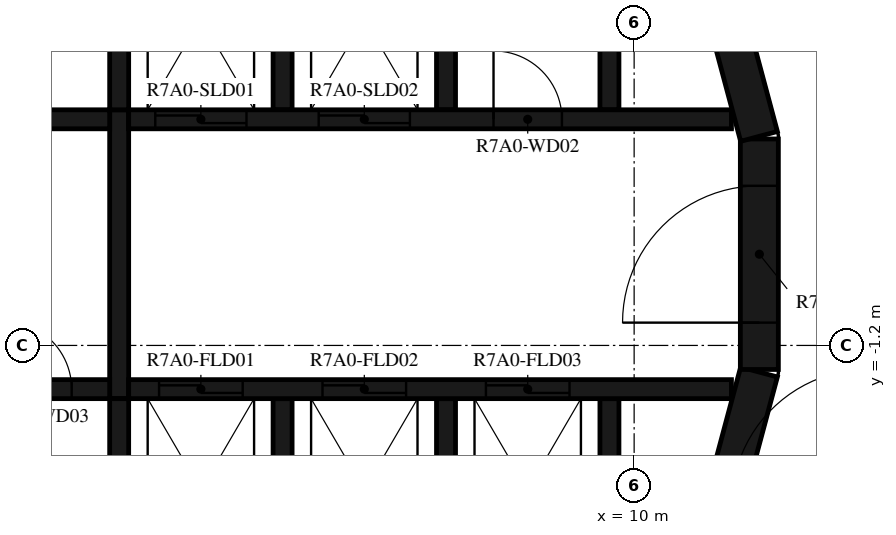
"""IFC4 building model, lengths in metres.
Left out: names, types, materials, properties, quantities, classifications, styles, units other than length and angle.
Written with IfcOpenShell. Run it as: python <this file> out.ifc"""

import sys

from ifc_helpers import new_model, si_unit, direction, frame, frame_2d, origin, place, context, subcontext, project, spatial, polyline, rectangle, outline, extrude, element, fill, save


model = new_model("IFC4")
c1 = context("Model", 3, precision=1e-05, world=origin(), true_north=direction((0.0, 1.0)))
c2 = subcontext(c1, "Body", "Model", "MODEL_VIEW")
j1 = project(units=[si_unit("LENGTHUNIT", "METRE"), si_unit("PLANEANGLEUNIT", "RADIAN")], contexts=[c1])
p1 = place(None, origin())
s1 = spatial("IfcSite", under=j1, at=p1, CompositionType="ELEMENT")
p2 = place(p1, origin())
s2 = spatial("IfcBuilding", under=s1, at=p2, CompositionType="ELEMENT")
p3 = place(p2, frame((0.0, 0.0, 270.4)))
s3 = spatial("IfcBuildingStorey", under=s2, at=p3, CompositionType="ELEMENT", Elevation=270.4)
p4 = place(p3, frame((10.858, -4.479, 0.0), z_axis=(0.0, 0.0, 1.0), x_axis=(0.258734743916, 0.965948410781, 0.0)))
e1 = element("IfcWall", 1, at=p4, inside=s3, PredefinedType="SHEAR", context=c2, shape_type="SweptSolid", body=[
    extrude(rectangle(XDim=3.033, YDim=0.5, at=frame_2d((1.516, 0.0))), origin(), (0.0, 0.0, 1.0), 3.12),
])
p5 = place(p3, frame((11.647, -1.516, 0.0), z_axis=(0.0, 0.0, 1.0), x_axis=(0.0, 1.0, 0.0)))
e2 = element("IfcWall", 2, at=p5, inside=s3, PredefinedType="SHEAR", context=c2, shape_type="SweptSolid", body=[
    extrude(rectangle(XDim=3.033, YDim=0.5, at=frame_2d((1.516, 0.0))), origin(), (0.0, 0.0, 1.0), 3.12),
])
p6 = place(p5, frame((0.616, 0.0, 0.0)))
e3 = element("IfcOpeningElement", 3, at=p6, cuts=e2, PredefinedType="OPENING", context=c2, shape_type="SweptSolid", body=[
    extrude(rectangle(XDim=1.8, YDim=2.1, at=frame_2d((0.9, 1.05))), frame((0.0, 0.26, 0.0), z_axis=(0.0, -1.0, 0.0), x_axis=(1.0, 0.0, 0.0)), (0.0, 0.0, 1.0), 0.52),
])
p7 = place(p3, frame((11.643, 1.55, 0.0), z_axis=(0.0, 0.0, 1.0), x_axis=(-0.258734743916, 0.965948410781, 0.0)))
e4 = element("IfcWall", 4, at=p7, inside=s3, PredefinedType="SHEAR", context=c2, shape_type="SweptSolid", body=[
    extrude(rectangle(XDim=3.033, YDim=0.5, at=frame_2d((1.516, 0.0))), origin(), (0.0, 0.0, 1.0), 3.12),
])
p8 = place(p3, origin())
e5 = element("IfcWall", 5, at=p8, inside=s3, PredefinedType="SHEAR", context=c2, shape_type="SweptSolid", body=[
    extrude(outline(polyline([(-9.8, 1.9), (-9.55, 1.9), (-9.55, 4.8), (3.1, 4.8), (3.1, 1.9), (3.35, 1.9), (3.35, 4.8), (5.25, 4.8), (5.25, 1.9), (5.5, 1.9), (5.5, 4.8), (7.4, 4.8), (7.4, 1.9), (7.65, 1.9), (7.65, 4.8), (9.55, 4.8), (9.55, 1.9), (9.8, 1.9), (9.8, 4.8), (9.8, 5.05), (-9.8, 5.05), (-9.8, 4.8), (-9.8, 1.9)])), origin(), (0.0, 0.0, 1.0), 3.12),
])
p9 = place(p3, origin())
e6 = element("IfcWall", 6, at=p9, inside=s3, PredefinedType="SHEAR", context=c2, shape_type="SweptSolid", body=[
    extrude(outline(polyline([(9.8, -5.05), (9.8, -4.8), (9.8, -1.9), (9.55, -1.9), (9.55, -4.8), (7.65, -4.8), (7.65, -1.9), (7.4, -1.9), (7.4, -4.8), (5.5, -4.8), (5.5, -1.9), (5.25, -1.9), (5.25, -4.8), (3.35, -4.8), (3.35, -1.9), (3.1, -1.9), (3.1, -4.8), (1.2, -4.8), (1.2, -1.9), (0.95, -1.9), (0.95, -4.8), (-0.95, -4.8), (-0.95, -1.9), (-1.2, -1.9), (-1.2, -4.8), (-3.1, -4.8), (-3.1, -1.9), (-3.35, -1.9), (-3.35, -4.8), (-5.25, -4.8), (-5.25, -1.9), (-5.5, -1.9), (-5.5, -4.8), (-7.4, -4.8), (-7.4, -1.9), (-7.65, -1.9), (-7.65, -4.8), (-9.55, -4.8), (-9.55, -1.9), (-9.8, -1.9), (-9.8, -4.8), (-9.8, -5.05), (9.8, -5.05)])), origin(), (0.0, 0.0, 1.0), 3.12),
])
p10 = place(p3, frame((-11.28, 1.775, 0.0), z_axis=(0.0, 0.0, 1.0), x_axis=(1.0, 0.0, 0.0)))
e7 = element("IfcWall", 7, at=p10, inside=s3, PredefinedType="SHEAR", context=c2, shape_type="SweptSolid", body=[
    extrude(rectangle(XDim=14.38, YDim=0.25, at=frame_2d((7.19, 0.0))), origin(), (0.0, 0.0, 1.0), 3.12),
])
p11 = place(p10, frame((7.605, 0.0, 0.0)))
e8 = element("IfcOpeningElement", 8, at=p11, cuts=e7, PredefinedType="OPENING", context=c2, shape_type="SweptSolid", body=[
    extrude(rectangle(XDim=0.9, YDim=2.1, at=frame_2d((0.45, 1.05))), frame((0.0, 0.135, 0.0), z_axis=(0.0, -1.0, 0.0), x_axis=(1.0, 0.0, 0.0)), (0.0, 0.0, 1.0), 0.27),
])
p12 = place(p3, frame((3.35, 1.775, 0.0), z_axis=(0.0, 0.0, 1.0), x_axis=(1.0, 0.0, 0.0)))
e9 = element("IfcWall", 9, at=p12, inside=s3, PredefinedType="SHEAR", context=c2, shape_type="SweptSolid", body=[
    extrude(rectangle(XDim=7.93, YDim=0.25, at=frame_2d((3.965, 0.0))), origin(), (0.0, 0.0, 1.0), 3.12),
])
p13 = place(p12, frame((0.35, 0.0, 0.0)))
e10 = element("IfcOpeningElement", 10, at=p13, cuts=e9, PredefinedType="OPENING", context=c2, shape_type="SweptSolid", body=[
    extrude(rectangle(XDim=1.2, YDim=2.4, at=frame_2d((0.6, 1.2))), frame((0.0, 0.135, 0.0), z_axis=(0.0, -1.0, 0.0), x_axis=(1.0, 0.0, 0.0)), (0.0, 0.0, 1.0), 0.27),
])
p14 = place(p12, frame((2.5, 0.0, 0.0)))
e11 = element("IfcOpeningElement", 11, at=p14, cuts=e9, PredefinedType="OPENING", context=c2, shape_type="SweptSolid", body=[
    extrude(rectangle(XDim=1.2, YDim=2.4, at=frame_2d((0.6, 1.2))), frame((0.0, 0.135, 0.0), z_axis=(0.0, -1.0, 0.0), x_axis=(1.0, 0.0, 0.0)), (0.0, 0.0, 1.0), 0.27),
])
p15 = place(p12, frame((4.8, 0.0, 0.0)))
e12 = element("IfcOpeningElement", 12, at=p15, cuts=e9, PredefinedType="OPENING", context=c2, shape_type="SweptSolid", body=[
    extrude(rectangle(XDim=0.9, YDim=2.1, at=frame_2d((0.45, 1.05))), frame((0.0, 0.135, 0.0), z_axis=(0.0, -1.0, 0.0), x_axis=(1.0, 0.0, 0.0)), (0.0, 0.0, 1.0), 0.27),
])
p16 = place(p3, frame((-11.28, -1.775, 0.0), z_axis=(0.0, 0.0, 1.0), x_axis=(1.0, 0.0, 0.0)))
e13 = element("IfcWall", 13, at=p16, inside=s3, PredefinedType="SHEAR", context=c2, shape_type="SweptSolid", body=[
    extrude(rectangle(XDim=14.38, YDim=0.25, at=frame_2d((7.19, 0.0))), origin(), (0.0, 0.0, 1.0), 3.12),
])
p17 = place(p16, frame((2.03, 0.0, 0.0)))
e14 = element("IfcOpeningElement", 14, at=p17, cuts=e13, PredefinedType="OPENING", context=c2, shape_type="SweptSolid", body=[
    extrude(rectangle(XDim=1.3, YDim=2.1, at=frame_2d((0.65, 1.05))), frame((0.0, 0.135, 0.0), z_axis=(0.0, -1.0, 0.0), x_axis=(1.0, 0.0, 0.0)), (0.0, 0.0, 1.0), 0.27),
])
p18 = place(p16, frame((4.18, 0.0, 0.0)))
e15 = element("IfcOpeningElement", 15, at=p18, cuts=e13, PredefinedType="OPENING", context=c2, shape_type="SweptSolid", body=[
    extrude(rectangle(XDim=1.3, YDim=2.1, at=frame_2d((0.65, 1.05))), frame((0.0, 0.135, 0.0), z_axis=(0.0, -1.0, 0.0), x_axis=(1.0, 0.0, 0.0)), (0.0, 0.0, 1.0), 0.27),
])
p19 = place(p16, frame((6.43, 0.0, 0.0)))
e16 = element("IfcOpeningElement", 16, at=p19, cuts=e13, PredefinedType="OPENING", context=c2, shape_type="SweptSolid", body=[
    extrude(rectangle(XDim=1.1, YDim=2.1, at=frame_2d((0.55, 1.05))), frame((0.0, 0.135, 0.0), z_axis=(0.0, -1.0, 0.0), x_axis=(1.0, 0.0, 0.0)), (0.0, 0.0, 1.0), 0.27),
])
p20 = place(p16, frame((8.58, 0.0, 0.0)))
e17 = element("IfcOpeningElement", 17, at=p20, cuts=e13, PredefinedType="OPENING", context=c2, shape_type="SweptSolid", body=[
    extrude(rectangle(XDim=1.1, YDim=2.1, at=frame_2d((0.55, 1.05))), frame((0.0, 0.135, 0.0), z_axis=(0.0, -1.0, 0.0), x_axis=(1.0, 0.0, 0.0)), (0.0, 0.0, 1.0), 0.27),
])
p21 = place(p16, frame((10.73, 0.0, 0.0)))
e18 = element("IfcOpeningElement", 18, at=p21, cuts=e13, PredefinedType="OPENING", context=c2, shape_type="SweptSolid", body=[
    extrude(rectangle(XDim=1.1, YDim=2.1, at=frame_2d((0.55, 1.05))), frame((0.0, 0.135, 0.0), z_axis=(0.0, -1.0, 0.0), x_axis=(1.0, 0.0, 0.0)), (0.0, 0.0, 1.0), 0.27),
])
p22 = place(p16, frame((12.98, 0.0, 0.0)))
e19 = element("IfcOpeningElement", 19, at=p22, cuts=e13, PredefinedType="OPENING", context=c2, shape_type="SweptSolid", body=[
    extrude(rectangle(XDim=0.9, YDim=2.1, at=frame_2d((0.45, 1.05))), frame((0.0, 0.135, 0.0), z_axis=(0.0, -1.0, 0.0), x_axis=(1.0, 0.0, 0.0)), (0.0, 0.0, 1.0), 0.27),
])
p23 = place(p3, frame((3.35, -1.775, 0.0), z_axis=(0.0, 0.0, 1.0), x_axis=(1.0, 0.0, 0.0)))
e20 = element("IfcWall", 20, at=p23, inside=s3, PredefinedType="SHEAR", context=c2, shape_type="SweptSolid", body=[
    extrude(rectangle(XDim=7.93, YDim=0.25, at=frame_2d((3.965, 0.0))), origin(), (0.0, 0.0, 1.0), 3.12),
])
p24 = place(p23, frame((0.4, 0.0, 0.0)))
e21 = element("IfcOpeningElement", 21, at=p24, cuts=e20, PredefinedType="OPENING", context=c2, shape_type="SweptSolid", body=[
    extrude(rectangle(XDim=1.1, YDim=2.4, at=frame_2d((0.55, 1.2))), frame((0.0, 0.135, 0.0), z_axis=(0.0, -1.0, 0.0), x_axis=(1.0, 0.0, 0.0)), (0.0, 0.0, 1.0), 0.27),
])
p25 = place(p23, frame((2.55, 0.0, 0.0)))
e22 = element("IfcOpeningElement", 22, at=p25, cuts=e20, PredefinedType="OPENING", context=c2, shape_type="SweptSolid", body=[
    extrude(rectangle(XDim=1.1, YDim=2.4, at=frame_2d((0.55, 1.2))), frame((0.0, 0.135, 0.0), z_axis=(0.0, -1.0, 0.0), x_axis=(1.0, 0.0, 0.0)), (0.0, 0.0, 1.0), 0.27),
])
p26 = place(p23, frame((4.7, 0.0, 0.0)))
e23 = element("IfcOpeningElement", 23, at=p26, cuts=e20, PredefinedType="OPENING", context=c2, shape_type="SweptSolid", body=[
    extrude(rectangle(XDim=1.1, YDim=2.4, at=frame_2d((0.55, 1.2))), frame((0.0, 0.135, 0.0), z_axis=(0.0, -1.0, 0.0), x_axis=(1.0, 0.0, 0.0)), (0.0, 0.0, 1.0), 0.27),
])
p27 = place(p3, frame((3.225, -1.9, 0.0), z_axis=(0.0, 0.0, 1.0), x_axis=(0.0, 1.0, 0.0)))
e24 = element("IfcWall", 24, at=p27, inside=s3, PredefinedType="SHEAR", context=c2, shape_type="SweptSolid", body=[
    extrude(rectangle(XDim=3.8, YDim=0.25, at=frame_2d((1.9, 0.0))), origin(), (0.0, 0.0, 1.0), 3.12),
])
p28 = place(p3, frame((11.223, -8.154, 0.0), z_axis=(0.0, 0.0, 1.0), x_axis=(0.358341090983, 0.93359073609, 0.0)))
e25 = element("IfcWall", 25, at=p28, inside=s3, PredefinedType="STANDARD", context=c2, shape_type="SweptSolid", body=[
    extrude(rectangle(XDim=7.181, YDim=0.2, at=frame_2d((3.59, 0.0))), origin(), (0.0, 0.0, 1.0), 3.12),
])
p29 = place(p28, frame((5.185, 0.0, 0.0)))
e26 = element("IfcOpeningElement", 26, at=p29, cuts=e25, PredefinedType="OPENING", context=c2, shape_type="SweptSolid", body=[
    extrude(rectangle(XDim=1.8, YDim=2.1, at=frame_2d((0.9, 1.05))), frame((0.0, 0.11, 0.0), z_axis=(0.0, -1.0, 0.0), x_axis=(1.0, 0.0, 0.0)), (0.0, 0.0, 1.0), 0.22),
])
p30 = place(p6, origin())
e27 = element("IfcDoor", 27, at=p30, inside=s3, OperationType="DOUBLE_DOOR_SINGLE_SWING", PredefinedType="DOOR", context=c2, shape_type="SweptSolid", body=[
    extrude(rectangle(XDim=1.8, YDim=2.1, at=frame_2d((0.9, 1.05))), frame((0.0, 0.025, 0.0), z_axis=(0.0, -1.0, 0.0), x_axis=(1.0, 0.0, 0.0)), (0.0, 0.0, 1.0), 0.05),
])
fill(e3, e27)
p31 = place(p13, origin())
e28 = element("IfcDoor", 28, at=p31, inside=s3, OperationType="DOUBLE_DOOR_SLIDING", PredefinedType="DOOR", context=c2, shape_type="SweptSolid", body=[
    extrude(rectangle(XDim=1.2, YDim=2.4, at=frame_2d((0.6, 1.2))), frame((0.0, 0.025, 0.0), z_axis=(0.0, -1.0, 0.0), x_axis=(1.0, 0.0, 0.0)), (0.0, 0.0, 1.0), 0.05),
])
fill(e10, e28)
p32 = place(p14, origin())
e29 = element("IfcDoor", 29, at=p32, inside=s3, OperationType="DOUBLE_DOOR_SLIDING", PredefinedType="DOOR", context=c2, shape_type="SweptSolid", body=[
    extrude(rectangle(XDim=1.2, YDim=2.4, at=frame_2d((0.6, 1.2))), frame((0.0, 0.025, 0.0), z_axis=(0.0, -1.0, 0.0), x_axis=(1.0, 0.0, 0.0)), (0.0, 0.0, 1.0), 0.05),
])
fill(e11, e29)
p33 = place(p24, origin())
e30 = element("IfcDoor", 30, at=p33, inside=s3, OperationType="DOUBLE_DOOR_SLIDING", PredefinedType="DOOR", context=c2, shape_type="SweptSolid", body=[
    extrude(rectangle(XDim=1.1, YDim=2.4, at=frame_2d((0.55, 1.2))), frame((0.0, 0.025, 0.0), z_axis=(0.0, -1.0, 0.0), x_axis=(1.0, 0.0, 0.0)), (0.0, 0.0, 1.0), 0.05),
])
fill(e21, e30)
p34 = place(p25, origin())
e31 = element("IfcDoor", 31, at=p34, inside=s3, OperationType="DOUBLE_DOOR_SLIDING", PredefinedType="DOOR", context=c2, shape_type="SweptSolid", body=[
    extrude(rectangle(XDim=1.1, YDim=2.4, at=frame_2d((0.55, 1.2))), frame((0.0, 0.025, 0.0), z_axis=(0.0, -1.0, 0.0), x_axis=(1.0, 0.0, 0.0)), (0.0, 0.0, 1.0), 0.05),
])
fill(e22, e31)
p35 = place(p26, origin())
e32 = element("IfcDoor", 32, at=p35, inside=s3, OperationType="DOUBLE_DOOR_SLIDING", PredefinedType="DOOR", context=c2, shape_type="SweptSolid", body=[
    extrude(rectangle(XDim=1.1, YDim=2.4, at=frame_2d((0.55, 1.2))), frame((0.0, 0.025, 0.0), z_axis=(0.0, -1.0, 0.0), x_axis=(1.0, 0.0, 0.0)), (0.0, 0.0, 1.0), 0.05),
])
fill(e23, e32)
p36 = place(p15, origin())
e33 = element("IfcDoor", 33, at=p36, inside=s3, OperationType="SINGLE_SWING_RIGHT", PredefinedType="DOOR", context=c2, shape_type="SweptSolid", body=[
    extrude(rectangle(XDim=0.9, YDim=2.1, at=frame_2d((0.45, 1.05))), frame((0.0, 0.025, 0.0), z_axis=(0.0, -1.0, 0.0), x_axis=(1.0, 0.0, 0.0)), (0.0, 0.0, 1.0), 0.05),
])
fill(e12, e33)
p37 = place(p22, origin())
e34 = element("IfcDoor", 34, at=p37, inside=s3, OperationType="SINGLE_SWING_LEFT", PredefinedType="DOOR", context=c2, shape_type="SweptSolid", body=[
    extrude(rectangle(XDim=0.9, YDim=2.1, at=frame_2d((0.45, 1.05))), frame((0.0, 0.025, 0.0), z_axis=(0.0, -1.0, 0.0), x_axis=(1.0, 0.0, 0.0)), (0.0, 0.0, 1.0), 0.05),
])
fill(e19, e34)
save(model, sys.argv[1])
